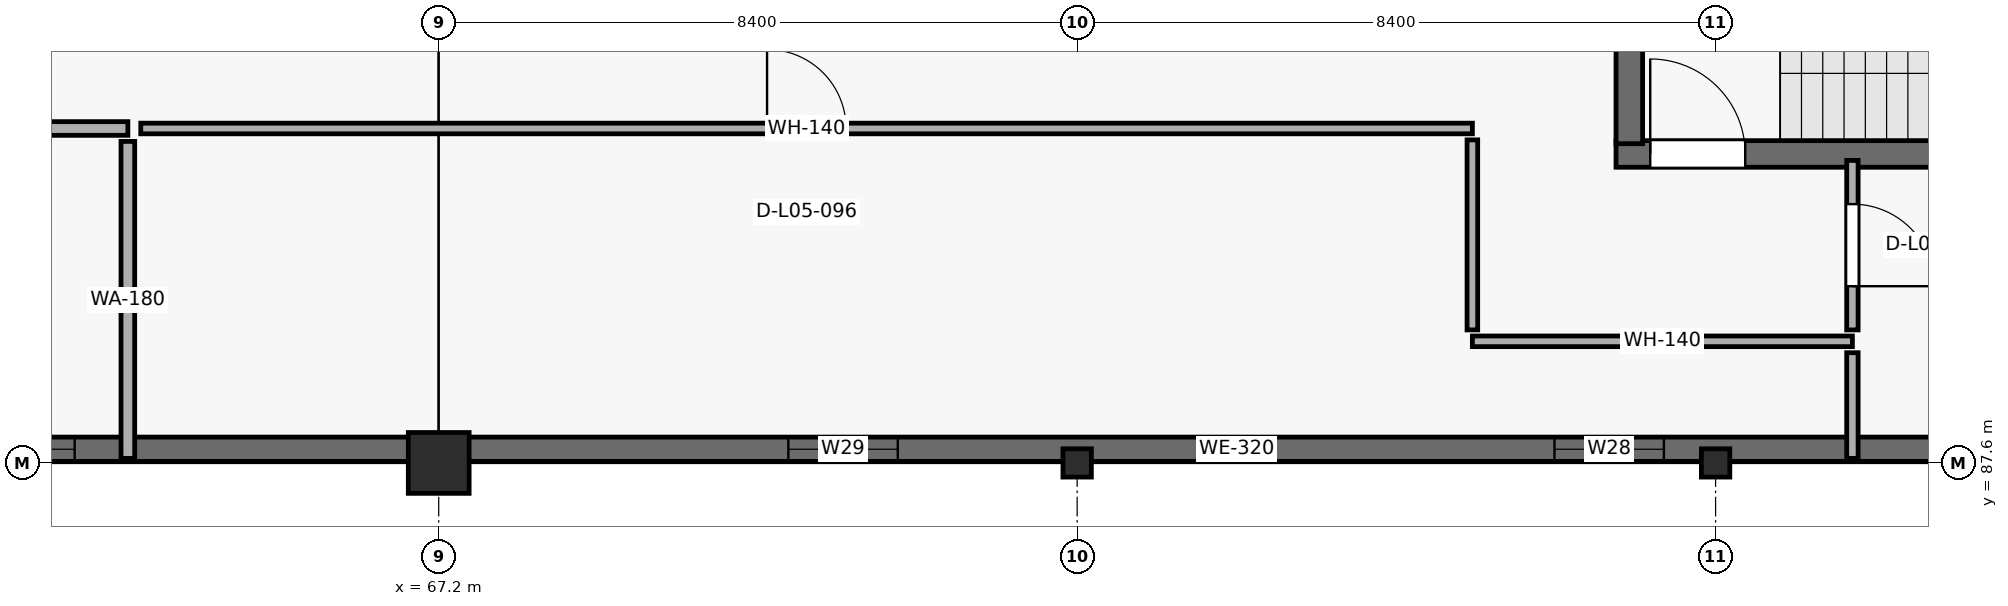
"""IFC4 building model, lengths in metres.
Left out: names, types, materials, properties, quantities, classifications, styles, units other than length and angle.
Written with IfcOpenShell. Run it as: python <this file> out.ifc"""

import sys

from ifc_helpers import new_model, si_unit, direction, frame, frame_2d, origin, origin_2d, place, context, subcontext, project, spatial, rectangle, i_section, extrude, element, fill, save


model = new_model("IFC4")
c1 = context("Model", 3, precision=1e-05, world=origin(), true_north=direction((0.0, 1.0)))
c2 = subcontext(c1, "Body", "Model", "MODEL_VIEW")
j1 = project(units=[si_unit("LENGTHUNIT", "METRE"), si_unit("PLANEANGLEUNIT", "RADIAN")], contexts=[c1])
p1 = place(None, origin())
s1 = spatial("IfcSite", under=j1, at=p1, CompositionType="ELEMENT")
p2 = place(p1, origin())
s2 = spatial("IfcBuilding", under=s1, at=p2, CompositionType="ELEMENT")
p3 = place(p2, frame((0.0, 0.0, 20.4)))
s3 = spatial("IfcBuildingStorey", under=s2, at=p3, CompositionType="ELEMENT", Elevation=20.4)
p4 = place(p3, frame((67.2, 87.6, 0.0), z_axis=(0.0, 0.0, 1.0), x_axis=(1.0, 0.0, 0.0)))
e1 = element("IfcColumn", 1, at=p4, inside=s3, PredefinedType="COLUMN", context=c2, shape_type="SweptSolid", body=[
    extrude(rectangle(XDim=0.8, YDim=0.8, at=origin_2d()), origin(), (0.0, 0.0, 1.0), 5.1),
])
for number, where, z_axis, x_axis in (
    (2, (75.6, 87.6, 0.0), (0.0, 0.0, 1.0), (1.0, 0.0, 0.0)),
    (3, (84.0, 87.6, 0.0), (0.0, 0.0, 1.0), (1.0, 0.0, 0.0)),
):
    element("IfcColumn", number, at=place(p3, frame(where, z_axis=z_axis, x_axis=x_axis)), inside=s3, PredefinedType="COLUMN", context=c2, shape_type="SweptSolid", body=[
        extrude(i_section(OverallWidth=0.374, OverallDepth=0.372, WebThickness=0.016, FlangeThickness=0.026, at=origin_2d()), origin(), (0.0, 0.0, 1.0), 5.1),
    ])
p5 = place(p3, frame((88.2, 87.78, 0.0), z_axis=(0.0, 0.0, 1.0), x_axis=(-1.0, 0.0, 0.0)))
e4 = element("IfcWall", 4, at=p5, inside=s3, PredefinedType="SOLIDWALL", context=c2, shape_type="SweptSolid", body=[
    extrude(rectangle(XDim=21.0, YDim=0.32, at=frame_2d((10.5, 0.0))), origin(), (0.0, 0.0, 1.0), 4.84),
])
p6 = place(p5, frame((4.88, 0.0, 0.75)))
e5 = element("IfcOpeningElement", 5, at=p6, cuts=e4, PredefinedType="OPENING", context=c2, shape_type="SweptSolid", body=[
    extrude(rectangle(XDim=1.44, YDim=2.65, at=frame_2d((0.72, 1.325))), frame((0.0, 0.17, 0.0), z_axis=(0.0, -1.0, 0.0), x_axis=(1.0, 0.0, 0.0)), (0.0, 0.0, 1.0), 0.34),
])
p7 = place(p5, frame((14.96, 0.0, 0.75)))
e6 = element("IfcOpeningElement", 6, at=p7, cuts=e4, PredefinedType="OPENING", context=c2, shape_type="SweptSolid", body=[
    extrude(rectangle(XDim=1.44, YDim=3.05, at=frame_2d((0.72, 1.525))), frame((0.0, 0.17, 0.0), z_axis=(0.0, -1.0, 0.0), x_axis=(1.0, 0.0, 0.0)), (0.0, 0.0, 1.0), 0.34),
])
p8 = place(p3, frame((67.2, 87.78, 0.0), z_axis=(0.0, 0.0, 1.0), x_axis=(-1.0, 0.0, 0.0)))
e7 = element("IfcWall", 7, at=p8, inside=s3, PredefinedType="SOLIDWALL", context=c2, shape_type="SweptSolid", body=[
    extrude(rectangle(XDim=29.4, YDim=0.32, at=frame_2d((14.7, 0.0))), origin(), (0.0, 0.0, 1.0), 4.84),
])
p9 = place(p8, frame((4.79, 0.0, 0.75)))
e8 = element("IfcOpeningElement", 8, at=p9, cuts=e7, PredefinedType="OPENING", context=c2, shape_type="SweptSolid", body=[
    extrude(rectangle(XDim=1.62, YDim=1.85, at=frame_2d((0.81, 0.925))), frame((0.0, 0.17, 0.0), z_axis=(0.0, -1.0, 0.0), x_axis=(1.0, 0.0, 0.0)), (0.0, 0.0, 1.0), 0.34),
])
p10 = place(p3, frame((82.69, 91.665, 0.0), z_axis=(0.0, 0.0, 1.0), x_axis=(1.0, 0.0, 0.0)))
e9 = element("IfcWall", 9, at=p10, inside=s3, PredefinedType="SHEAR", context=c2, shape_type="SweptSolid", body=[
    extrude(rectangle(XDim=9.41, YDim=0.35, at=frame_2d((4.705, 0.0))), origin(), (0.0, 0.0, 1.0), 4.84),
])
p11 = place(p10, frame((0.45, 0.0, 0.0)))
e10 = element("IfcOpeningElement", 10, at=p11, cuts=e9, PredefinedType="OPENING", context=c2, shape_type="SweptSolid", body=[
    extrude(rectangle(XDim=1.25, YDim=2.2, at=frame_2d((0.625, 1.1))), frame((0.0, 0.185, 0.0), z_axis=(0.0, -1.0, 0.0), x_axis=(1.0, 0.0, 0.0)), (0.0, 0.0, 1.0), 0.37),
])
p12 = place(p3, frame((82.865, 91.8, 0.0), z_axis=(0.0, 0.0, 1.0), x_axis=(0.0, 1.0, 0.0)))
e11 = element("IfcWall", 11, at=p12, inside=s3, PredefinedType="SHEAR", context=c2, shape_type="SweptSolid", body=[
    extrude(rectangle(XDim=3.9, YDim=0.35, at=frame_2d((1.95, 0.0))), origin(), (0.0, 0.0, 1.0), 4.84),
])
p13 = place(p3, frame((34.4, 92.0, 0.0), z_axis=(0.0, 0.0, 1.0), x_axis=(1.0, 0.0, 0.0)))
e12 = element("IfcWall", 12, at=p13, inside=s3, PredefinedType="PARTITIONING", context=c2, shape_type="SweptSolid", body=[
    extrude(rectangle(XDim=28.71, YDim=0.18, at=frame_2d((14.355, 0.0))), origin(), (0.0, 0.0, 1.0), 4.84),
])
p14 = place(p13, frame((9.95, 0.0, 0.0)))
e13 = element("IfcOpeningElement", 13, at=p14, cuts=e12, PredefinedType="OPENING", context=c2, shape_type="SweptSolid", body=[
    extrude(rectangle(XDim=1.92, YDim=2.55, at=frame_2d((0.96, 1.275))), frame((0.0, 0.1, 0.0), z_axis=(0.0, -1.0, 0.0), x_axis=(1.0, 0.0, 0.0)), (0.0, 0.0, 1.0), 0.2),
])
p15 = place(p3, frame((63.28, 92.0, 0.0), z_axis=(0.0, 0.0, 1.0), x_axis=(1.0, 0.0, 0.0)))
e14 = element("IfcWall", 14, at=p15, inside=s3, PredefinedType="PARTITIONING", context=c2, shape_type="SweptSolid", body=[
    extrude(rectangle(XDim=17.52, YDim=0.14, at=frame_2d((8.76, 0.0))), origin(), (0.0, 0.0, 1.0), 4.84),
])
p16 = place(p15, frame((8.24, 0.0, 0.0)))
e15 = element("IfcOpeningElement", 15, at=p16, cuts=e14, PredefinedType="OPENING", context=c2, shape_type="SweptSolid", body=[
    extrude(rectangle(XDim=1.04, YDim=2.26, at=frame_2d((0.52, 1.13))), frame((0.0, 0.08, 0.0), z_axis=(0.0, -1.0, 0.0), x_axis=(1.0, 0.0, 0.0)), (0.0, 0.0, 1.0), 0.16),
])
p17 = place(p3, frame((80.8, 89.2, 0.0), z_axis=(0.0, 0.0, 1.0), x_axis=(1.0, 0.0, 0.0)))
e16 = element("IfcWall", 16, at=p17, inside=s3, PredefinedType="PARTITIONING", context=c2, shape_type="SweptSolid", body=[
    extrude(rectangle(XDim=5.0, YDim=0.14, at=frame_2d((2.5, 0.0))), origin(), (0.0, 0.0, 1.0), 4.84),
])
p18 = place(p3, frame((63.11, 91.83, 0.0), z_axis=(0.0, 0.0, 1.0), x_axis=(0.0, -1.0, 0.0)))
e17 = element("IfcWall", 17, at=p18, inside=s3, PredefinedType="PARTITIONING", context=c2, shape_type="SweptSolid", body=[
    extrude(rectangle(XDim=4.17, YDim=0.18, at=frame_2d((2.085, 0.0))), origin(), (0.0, 0.0, 1.0), 4.84),
])
p19 = place(p3, frame((85.8, 87.66, 0.0), z_axis=(0.0, 0.0, 1.0), x_axis=(0.0, 1.0, 0.0)))
e18 = element("IfcWall", 18, at=p19, inside=s3, PredefinedType="PARTITIONING", context=c2, shape_type="SweptSolid", body=[
    extrude(rectangle(XDim=1.39, YDim=0.15, at=frame_2d((0.695, 0.0))), origin(), (0.0, 0.0, 1.0), 4.84),
])
p20 = place(p3, frame((85.8, 89.35, 0.0), z_axis=(0.0, 0.0, 1.0), x_axis=(0.0, 1.0, 0.0)))
e19 = element("IfcWall", 19, at=p20, inside=s3, PredefinedType="PARTITIONING", context=c2, shape_type="SweptSolid", body=[
    extrude(rectangle(XDim=2.23, YDim=0.15, at=frame_2d((1.115, 0.0))), origin(), (0.0, 0.0, 1.0), 4.84),
])
p21 = place(p20, frame((0.575, 0.0, 0.0)))
e20 = element("IfcOpeningElement", 20, at=p21, cuts=e19, PredefinedType="OPENING", context=c2, shape_type="SweptSolid", body=[
    extrude(rectangle(XDim=1.08, YDim=2.28, at=frame_2d((0.54, 1.14))), frame((0.0, 0.085, 0.0), z_axis=(0.0, -1.0, 0.0), x_axis=(1.0, 0.0, 0.0)), (0.0, 0.0, 1.0), 0.17),
])
p22 = place(p3, frame((80.8, 91.85, 0.0), z_axis=(0.0, 0.0, 1.0), x_axis=(0.0, -1.0, 0.0)))
e21 = element("IfcWall", 21, at=p22, inside=s3, PredefinedType="PARTITIONING", context=c2, shape_type="SweptSolid", body=[
    extrude(rectangle(XDim=2.5, YDim=0.14, at=frame_2d((1.25, 0.0))), origin(), (0.0, 0.0, 1.0), 4.84),
])
p23 = place(p6, origin())
e22 = element("IfcWindow", 22, at=p23, inside=s3, PartitioningType="SINGLE_PANEL", PredefinedType="WINDOW", context=c2, shape_type="SweptSolid", body=[
    extrude(rectangle(XDim=1.44, YDim=2.65, at=frame_2d((0.72, 1.325))), frame((0.0, 0.03, 0.0), z_axis=(0.0, -1.0, 0.0), x_axis=(1.0, 0.0, 0.0)), (0.0, 0.0, 1.0), 0.06),
])
fill(e5, e22)
p24 = place(p7, origin())
e23 = element("IfcWindow", 23, at=p24, inside=s3, PartitioningType="SINGLE_PANEL", PredefinedType="WINDOW", context=c2, shape_type="SweptSolid", body=[
    extrude(rectangle(XDim=1.44, YDim=3.05, at=frame_2d((0.72, 1.525))), frame((0.0, 0.03, 0.0), z_axis=(0.0, -1.0, 0.0), x_axis=(1.0, 0.0, 0.0)), (0.0, 0.0, 1.0), 0.06),
])
fill(e6, e23)
p25 = place(p9, origin())
e24 = element("IfcWindow", 24, at=p25, inside=s3, PartitioningType="SINGLE_PANEL", PredefinedType="WINDOW", context=c2, shape_type="SweptSolid", body=[
    extrude(rectangle(XDim=1.62, YDim=1.85, at=frame_2d((0.81, 0.925))), frame((0.0, 0.03, 0.0), z_axis=(0.0, -1.0, 0.0), x_axis=(1.0, 0.0, 0.0)), (0.0, 0.0, 1.0), 0.06),
])
fill(e8, e24)
p26 = place(p11, origin())
e25 = element("IfcDoor", 25, at=p26, inside=s3, OperationType="SINGLE_SWING_LEFT", PredefinedType="DOOR", context=c2, shape_type="SweptSolid", body=[
    extrude(rectangle(XDim=1.25, YDim=2.2, at=frame_2d((0.625, 1.1))), frame((0.0, 0.025, 0.0), z_axis=(0.0, -1.0, 0.0), x_axis=(1.0, 0.0, 0.0)), (0.0, 0.0, 1.0), 0.05),
])
fill(e10, e25)
p27 = place(p16, origin())
e26 = element("IfcDoor", 26, at=p27, inside=s3, OperationType="SINGLE_SWING_LEFT", PredefinedType="DOOR", context=c2, shape_type="SweptSolid", body=[
    extrude(rectangle(XDim=1.04, YDim=2.26, at=frame_2d((0.52, 1.13))), frame((0.0, 0.025, 0.0), z_axis=(0.0, -1.0, 0.0), x_axis=(1.0, 0.0, 0.0)), (0.0, 0.0, 1.0), 0.05),
])
fill(e15, e26)
p28 = place(p21, origin())
e27 = element("IfcDoor", 27, at=p28, inside=s3, OperationType="SINGLE_SWING_RIGHT", PredefinedType="DOOR", context=c2, shape_type="SweptSolid", body=[
    extrude(rectangle(XDim=1.08, YDim=2.28, at=frame_2d((0.54, 1.14))), frame((0.0, 0.025, 0.0), z_axis=(0.0, -1.0, 0.0), x_axis=(1.0, 0.0, 0.0)), (0.0, 0.0, 1.0), 0.05),
])
fill(e20, e27)
save(model, sys.argv[1])
